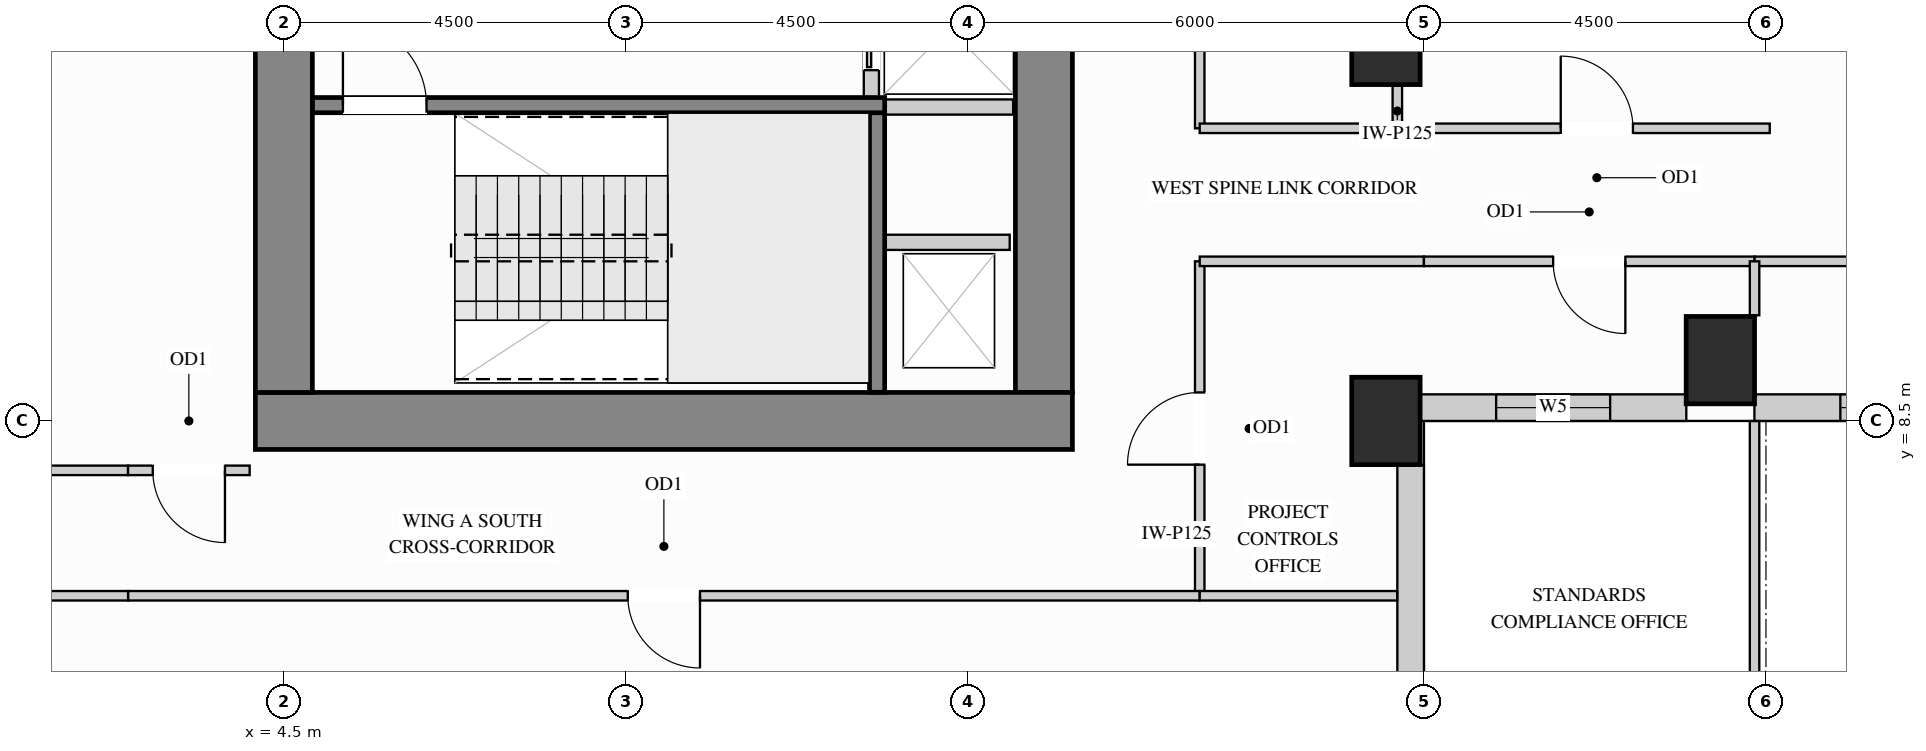
"""IFC4 building model, lengths in metres.
Left out: names, types, materials, properties, quantities, classifications, styles, units other than length and angle.
Written with IfcOpenShell. Run it as: python <this file> out.ifc"""

import sys

from ifc_helpers import new_model, si_unit, direction, frame, frame_2d, origin, origin_2d, place, context, subcontext, project, spatial, rectangle, extrude, source, transform, mapped, element, fill, save


model = new_model("IFC4")
c1 = context("Model", 3, precision=1e-05, world=origin(), true_north=direction((0.0, 1.0)))
c2 = subcontext(c1, "Body", "Model", "MODEL_VIEW")
j1 = project(units=[si_unit("LENGTHUNIT", "METRE"), si_unit("PLANEANGLEUNIT", "RADIAN")], contexts=[c1])
p1 = place(None, origin())
s1 = spatial("IfcSite", under=j1, at=p1, CompositionType="ELEMENT")
p2 = place(p1, origin())
s2 = spatial("IfcBuilding", under=s1, at=p2, CompositionType="ELEMENT")
p3 = place(p2, frame((0.0, 0.0, 109.8)))
s3 = spatial("IfcBuildingStorey", under=s2, at=p3, CompositionType="ELEMENT", Elevation=109.8)
m1 = source(origin(), c2, "Body", "SweptSolid", [
    extrude(rectangle(XDim=0.9, YDim=1.15, at=origin_2d()), origin(), (0.0, 0.0, 1.0), 3.38),
])
for number, where, z_axis, x_axis in (
    (1, (19.0, 13.5, 0.0), (0.0, 0.0, 1.0), (1.0, 0.0, 0.0)),
    (2, (19.0, 8.5, 0.0), (0.0, 0.0, 1.0), (1.0, 0.0, 0.0)),
    (3, (23.4, 9.3, 0.0), (0.0, 0.0, 1.0), (1.0, 0.0, 0.0)),
):
    element("IfcColumn", number, at=place(p3, frame(where, z_axis=z_axis, x_axis=x_axis)), inside=s3, PredefinedType="COLUMN", context=c2, shape_type="MappedRepresentation", body=[
        mapped(m1, transform((0.0, 0.0, 0.0), x_axis=(1.0, 0.0, 0.0), y_axis=(0.0, 1.0, 0.0), z_axis=(0.0, 0.0, 1.0))),
    ])
m2 = source(origin(), c2, "Body", "SweptSolid", [
    extrude(rectangle(XDim=9.945, YDim=0.75, at=frame_2d((4.973, 0.0))), origin(), (0.0, 0.0, 1.0), 3.38),
])
p4 = place(p3, frame((14.5, 8.875, 0.0), z_axis=(0.0, 0.0, 1.0), x_axis=(0.0, 1.0, 0.0)))
e4 = element("IfcWall", 4, at=p4, inside=s3, PredefinedType="SHEAR", context=c2, shape_type="MappedRepresentation", body=[
    mapped(m2, transform((0.0, 0.0, 0.0), x_axis=(1.0, 0.0, 0.0), y_axis=(0.0, 1.0, 0.0), z_axis=(0.0, 0.0, 1.0))),
])
m3 = source(origin(), c2, "Body", "SweptSolid", [
    extrude(rectangle(XDim=10.75, YDim=0.75, at=frame_2d((5.375, 0.0))), origin(), (0.0, 0.0, 1.0), 3.38),
])
p5 = place(p3, frame((4.125, 8.5, 0.0), z_axis=(0.0, 0.0, 1.0), x_axis=(1.0, 0.0, 0.0)))
e5 = element("IfcWall", 5, at=p5, inside=s3, PredefinedType="SHEAR", context=c2, shape_type="MappedRepresentation", body=[
    mapped(m3, transform((0.0, 0.0, 0.0), x_axis=(1.0, 0.0, 0.0), y_axis=(0.0, 1.0, 0.0), z_axis=(0.0, 0.0, 1.0))),
])
m4 = source(origin(), c2, "Body", "SweptSolid", [
    extrude(rectangle(XDim=20.25, YDim=0.75, at=frame_2d((10.125, 0.0))), origin(), (0.0, 0.0, 1.0), 3.38),
])
p6 = place(p3, frame((4.5, 8.875, 0.0), z_axis=(0.0, 0.0, 1.0), x_axis=(0.0, 1.0, 0.0)))
e6 = element("IfcWall", 6, at=p6, inside=s3, PredefinedType="SHEAR", context=c2, shape_type="MappedRepresentation", body=[
    mapped(m4, transform((0.0, 0.0, 0.0), x_axis=(1.0, 0.0, 0.0), y_axis=(0.0, 1.0, 0.0), z_axis=(0.0, 0.0, 1.0))),
])
m5 = source(origin(), c2, "Body", "SweptSolid", [
    extrude(rectangle(XDim=3.854, YDim=0.35, at=frame_2d((1.927, 0.0))), origin(), (0.0, 0.0, 1.0), 2.519),
])
p7 = place(p3, frame((19.325, 4.073, 0.0), z_axis=(0.0, 0.0, 1.0), x_axis=(0.0, 1.0, 0.0)))
e7 = element("IfcWall", 7, at=p7, inside=s3, PredefinedType="SOLIDWALL", context=c2, shape_type="MappedRepresentation", body=[
    mapped(m5, transform((0.0, 0.0, 0.0), x_axis=(1.0, 0.0, 0.0), y_axis=(0.0, 1.0, 0.0), z_axis=(0.0, 0.0, 1.0))),
])
p8 = place(p3, frame((19.448, 8.675, 0.0), z_axis=(0.0, 0.0, 1.0), x_axis=(1.0, 0.0, 0.0)))
e8 = element("IfcWall", 8, at=p8, inside=s3, PredefinedType="SOLIDWALL", context=c2, shape_type="SweptSolid", body=[
    extrude(rectangle(XDim=3.504, YDim=0.35, at=frame_2d((1.752, 0.0))), origin(), (0.0, 0.0, 1.0), 3.365),
])
p9 = place(p8, frame((1.002, 0.0, 0.78)))
e9 = element("IfcOpeningElement", 9, at=p9, cuts=e8, PredefinedType="OPENING", context=c2, shape_type="SweptSolid", body=[
    extrude(rectangle(XDim=1.5, YDim=2.0, at=frame_2d((0.75, 1.0))), frame((0.0, 0.185, 0.0), z_axis=(0.0, -1.0, 0.0), x_axis=(1.0, 0.0, 0.0)), (0.0, 0.0, 1.0), 0.37),
])
p10 = place(p3, frame((23.848, 8.675, 0.0), z_axis=(0.0, 0.0, 1.0), x_axis=(1.0, 0.0, 0.0)))
e10 = element("IfcWall", 10, at=p10, inside=s3, PredefinedType="SOLIDWALL", context=c2, shape_type="SweptSolid", body=[
    extrude(rectangle(XDim=6.204, YDim=0.35, at=frame_2d((3.102, 0.0))), origin(), (0.0, 0.0, 1.0), 3.365),
])
p11 = place(p10, frame((1.131, 0.0, 0.78)))
e11 = element("IfcOpeningElement", 11, at=p11, cuts=e10, PredefinedType="OPENING", context=c2, shape_type="SweptSolid", body=[
    extrude(rectangle(XDim=1.5, YDim=2.0, at=frame_2d((0.75, 1.0))), frame((0.0, 0.185, 0.0), z_axis=(0.0, -1.0, 0.0), x_axis=(1.0, 0.0, 0.0)), (0.0, 0.0, 1.0), 0.37),
])
p12 = place(p10, frame((3.441, 0.0, 0.78)))
e12 = element("IfcOpeningElement", 12, at=p12, cuts=e10, PredefinedType="OPENING", context=c2, shape_type="SweptSolid", body=[
    extrude(rectangle(XDim=1.5, YDim=2.0, at=frame_2d((0.75, 1.0))), frame((0.0, 0.185, 0.0), z_axis=(0.0, -1.0, 0.0), x_axis=(1.0, 0.0, 0.0)), (0.0, 0.0, 1.0), 0.37),
])
m6 = source(origin(), c2, "Body", "SweptSolid", [
    extrude(rectangle(XDim=0.56, YDim=0.125, at=frame_2d((0.28, 0.0))), origin(), (0.0, 0.0, 1.0), 2.677),
])
p13 = place(p3, frame((19.15, 12.35, 0.0), z_axis=(0.0, 0.0, 1.0), x_axis=(0.0, 1.0, 0.0)))
e13 = element("IfcWall", 13, at=p13, inside=s3, PredefinedType="PARTITIONING", context=c2, shape_type="MappedRepresentation", body=[
    mapped(m6, transform((0.0, 0.0, 0.0), x_axis=(1.0, 0.0, 0.0), y_axis=(0.0, 1.0, 0.0), z_axis=(0.0, 0.0, 1.0))),
])
p14 = place(p3, frame((16.55, 12.35, 0.0), z_axis=(0.0, 0.0, 1.0), x_axis=(0.0, 1.0, 0.0)))
e14 = element("IfcWall", 14, at=p14, inside=s3, PredefinedType="PARTITIONING", context=c2, shape_type="SweptSolid", body=[
    extrude(rectangle(XDim=3.15, YDim=0.125, at=frame_2d((1.575, 0.0))), origin(), (0.0, 0.0, 1.0), 3.365),
])
p15 = place(p14, frame((1.1, 0.0, 0.0)))
e15 = element("IfcOpeningElement", 15, at=p15, cuts=e14, PredefinedType="OPENING", context=c2, shape_type="SweptSolid", body=[
    extrude(rectangle(XDim=0.95, YDim=2.15, at=frame_2d((0.475, 1.075))), frame((0.0, 0.073, 0.0), z_axis=(0.0, -1.0, 0.0), x_axis=(1.0, 0.0, 0.0)), (0.0, 0.0, 1.0), 0.145),
])
p16 = place(p3, frame((16.55, 6.2, 0.0), z_axis=(0.0, 0.0, 1.0), x_axis=(0.0, 1.0, 0.0)))
e16 = element("IfcWall", 16, at=p16, inside=s3, PredefinedType="PARTITIONING", context=c2, shape_type="SweptSolid", body=[
    extrude(rectangle(XDim=4.4, YDim=0.125, at=frame_2d((2.2, 0.0))), origin(), (0.0, 0.0, 1.0), 3.365),
])
p17 = place(p16, frame((1.725, 0.0, 0.0)))
e17 = element("IfcOpeningElement", 17, at=p17, cuts=e16, PredefinedType="OPENING", context=c2, shape_type="SweptSolid", body=[
    extrude(rectangle(XDim=0.95, YDim=2.15, at=frame_2d((0.475, 1.075))), frame((0.0, 0.073, 0.0), z_axis=(0.0, -1.0, 0.0), x_axis=(1.0, 0.0, 0.0)), (0.0, 0.0, 1.0), 0.145),
])
m7 = source(origin(), c2, "Body", "SweptSolid", [
    extrude(rectangle(XDim=2.098, YDim=0.125, at=frame_2d((1.049, 0.0))), origin(), (0.0, 0.0, 1.0), 3.365),
])
p18 = place(p3, frame((0.352, 7.85, 0.0), z_axis=(0.0, 0.0, 1.0), x_axis=(1.0, 0.0, 0.0)))
e18 = element("IfcWall", 18, at=p18, inside=s3, PredefinedType="PARTITIONING", context=c2, shape_type="MappedRepresentation", body=[
    mapped(m7, transform((0.0, 0.0, 0.0), x_axis=(1.0, 0.0, 0.0), y_axis=(0.0, 1.0, 0.0), z_axis=(0.0, 0.0, 1.0))),
])
p19 = place(p3, frame((2.45, 7.85, 0.0), z_axis=(0.0, 0.0, 1.0), x_axis=(1.0, 0.0, 0.0)))
e19 = element("IfcWall", 19, at=p19, inside=s3, PredefinedType="PARTITIONING", context=c2, shape_type="SweptSolid", body=[
    extrude(rectangle(XDim=1.6, YDim=0.125, at=frame_2d((0.8, 0.0))), origin(), (0.0, 0.0, 1.0), 3.365),
])
p20 = place(p19, frame((0.325, 0.0, 0.0)))
e20 = element("IfcOpeningElement", 20, at=p20, cuts=e19, PredefinedType="OPENING", context=c2, shape_type="SweptSolid", body=[
    extrude(rectangle(XDim=0.95, YDim=2.15, at=frame_2d((0.475, 1.075))), frame((0.0, 0.073, 0.0), z_axis=(0.0, -1.0, 0.0), x_axis=(1.0, 0.0, 0.0)), (0.0, 0.0, 1.0), 0.145),
])
m8 = source(origin(), c2, "Body", "SweptSolid", [
    extrude(rectangle(XDim=2.95, YDim=0.125, at=frame_2d((1.475, 0.0))), origin(), (0.0, 0.0, 1.0), 3.365),
])
p21 = place(p3, frame((16.55, 12.35, 0.0), z_axis=(0.0, 0.0, 1.0), x_axis=(1.0, 0.0, 0.0)))
e21 = element("IfcWall", 21, at=p21, inside=s3, PredefinedType="PARTITIONING", context=c2, shape_type="MappedRepresentation", body=[
    mapped(m8, transform((0.0, 0.0, 0.0), x_axis=(1.0, 0.0, 0.0), y_axis=(0.0, 1.0, 0.0), z_axis=(0.0, 0.0, 1.0))),
])
p22 = place(p3, frame((19.5, 12.35, 0.0), z_axis=(0.0, 0.0, 1.0), x_axis=(1.0, 0.0, 0.0)))
e22 = element("IfcWall", 22, at=p22, inside=s3, PredefinedType="PARTITIONING", context=c2, shape_type="SweptSolid", body=[
    extrude(rectangle(XDim=4.55, YDim=0.125, at=frame_2d((2.275, 0.0))), origin(), (0.0, 0.0, 1.0), 3.365),
])
p23 = place(p22, frame((1.8, 0.0, 0.0)))
e23 = element("IfcOpeningElement", 23, at=p23, cuts=e22, PredefinedType="OPENING", context=c2, shape_type="SweptSolid", body=[
    extrude(rectangle(XDim=0.95, YDim=2.15, at=frame_2d((0.475, 1.075))), frame((0.0, 0.073, 0.0), z_axis=(0.0, -1.0, 0.0), x_axis=(1.0, 0.0, 0.0)), (0.0, 0.0, 1.0), 0.145),
])
p24 = place(p3, frame((16.55, 10.6, 0.0), z_axis=(0.0, 0.0, 1.0), x_axis=(1.0, 0.0, 0.0)))
e24 = element("IfcWall", 24, at=p24, inside=s3, PredefinedType="PARTITIONING", context=c2, shape_type="MappedRepresentation", body=[
    mapped(m8, transform((0.0, 0.0, 0.0), x_axis=(1.0, 0.0, 0.0), y_axis=(0.0, 1.0, 0.0), z_axis=(0.0, 0.0, 1.0))),
])
p25 = place(p3, frame((19.5, 10.6, 0.0), z_axis=(0.0, 0.0, 1.0), x_axis=(1.0, 0.0, 0.0)))
e25 = element("IfcWall", 25, at=p25, inside=s3, PredefinedType="PARTITIONING", context=c2, shape_type="SweptSolid", body=[
    extrude(rectangle(XDim=4.35, YDim=0.125, at=frame_2d((2.175, 0.0))), origin(), (0.0, 0.0, 1.0), 3.365),
])
p26 = place(p25, frame((1.7, 0.0, 0.0)))
e26 = element("IfcOpeningElement", 26, at=p26, cuts=e25, PredefinedType="OPENING", context=c2, shape_type="SweptSolid", body=[
    extrude(rectangle(XDim=0.95, YDim=2.15, at=frame_2d((0.475, 1.075))), frame((0.0, 0.073, 0.0), z_axis=(0.0, -1.0, 0.0), x_axis=(1.0, 0.0, 0.0)), (0.0, 0.0, 1.0), 0.145),
])
p27 = place(p3, frame((23.85, 10.6, 0.0), z_axis=(0.0, 0.0, 1.0), x_axis=(1.0, 0.0, 0.0)))
e27 = element("IfcWall", 27, at=p27, inside=s3, PredefinedType="PARTITIONING", context=c2, shape_type="SweptSolid", body=[
    extrude(rectangle(XDim=6.0, YDim=0.125, at=frame_2d((3.0, 0.0))), origin(), (0.0, 0.0, 1.0), 3.365),
])
p28 = place(p27, frame((2.525, 0.0, 0.0)))
e28 = element("IfcOpeningElement", 28, at=p28, cuts=e27, PredefinedType="OPENING", context=c2, shape_type="SweptSolid", body=[
    extrude(rectangle(XDim=0.95, YDim=2.15, at=frame_2d((0.475, 1.075))), frame((0.0, 0.073, 0.0), z_axis=(0.0, -1.0, 0.0), x_axis=(1.0, 0.0, 0.0)), (0.0, 0.0, 1.0), 0.145),
])
m9 = source(origin(), c2, "Body", "SweptSolid", [
    extrude(rectangle(XDim=8.148, YDim=0.125, at=frame_2d((4.074, 0.0))), origin(), (0.0, 0.0, 1.0), 3.365),
])
p29 = place(p3, frame((23.85, 0.35, 0.0), z_axis=(0.0, 0.0, 1.0), x_axis=(0.0, 1.0, 0.0)))
e29 = element("IfcWall", 29, at=p29, inside=s3, PredefinedType="PARTITIONING", context=c2, shape_type="MappedRepresentation", body=[
    mapped(m9, transform((0.0, 0.0, 0.0), x_axis=(1.0, 0.0, 0.0), y_axis=(0.0, 1.0, 0.0), z_axis=(0.0, 0.0, 1.0))),
])
m10 = source(origin(), c2, "Body", "SweptSolid", [
    extrude(rectangle(XDim=0.71, YDim=0.125, at=frame_2d((0.355, 0.0))), origin(), (0.0, 0.0, 1.0), 3.365),
])
p30 = place(p3, frame((23.85, 9.89, 0.0), z_axis=(0.0, 0.0, 1.0), x_axis=(0.0, 1.0, 0.0)))
e30 = element("IfcWall", 30, at=p30, inside=s3, PredefinedType="PARTITIONING", context=c2, shape_type="MappedRepresentation", body=[
    mapped(m10, transform((0.0, 0.0, 0.0), x_axis=(1.0, 0.0, 0.0), y_axis=(0.0, 1.0, 0.0), z_axis=(0.0, 0.0, 1.0))),
])
p31 = place(p3, frame((2.45, 6.2, 0.0), z_axis=(0.0, 0.0, 1.0), x_axis=(1.0, 0.0, 0.0)))
e31 = element("IfcWall", 31, at=p31, inside=s3, PredefinedType="PARTITIONING", context=c2, shape_type="SweptSolid", body=[
    extrude(rectangle(XDim=14.1, YDim=0.125, at=frame_2d((7.05, 0.0))), origin(), (0.0, 0.0, 1.0), 2.828),
])
p32 = place(p31, frame((6.575, 0.0, 0.0)))
e32 = element("IfcOpeningElement", 32, at=p32, cuts=e31, PredefinedType="OPENING", context=c2, shape_type="SweptSolid", body=[
    extrude(rectangle(XDim=0.95, YDim=2.15, at=frame_2d((0.475, 1.075))), frame((0.0, 0.073, 0.0), z_axis=(0.0, -1.0, 0.0), x_axis=(1.0, 0.0, 0.0)), (0.0, 0.0, 1.0), 0.145),
])
m11 = source(origin(), c2, "Body", "SweptSolid", [
    extrude(rectangle(XDim=2.098, YDim=0.125, at=frame_2d((1.049, 0.0))), origin(), (0.0, 0.0, 1.0), 2.828),
])
p33 = place(p3, frame((0.352, 6.2, 0.0), z_axis=(0.0, 0.0, 1.0), x_axis=(1.0, 0.0, 0.0)))
e33 = element("IfcWall", 33, at=p33, inside=s3, PredefinedType="PARTITIONING", context=c2, shape_type="MappedRepresentation", body=[
    mapped(m11, transform((0.0, 0.0, 0.0), x_axis=(1.0, 0.0, 0.0), y_axis=(0.0, 1.0, 0.0), z_axis=(0.0, 0.0, 1.0))),
])
m12 = source(origin(), c2, "Body", "SweptSolid", [
    extrude(rectangle(XDim=2.598, YDim=0.125, at=frame_2d((1.299, 0.0))), origin(), (0.0, 0.0, 1.0), 2.828),
])
p34 = place(p3, frame((16.55, 6.2, 0.0), z_axis=(0.0, 0.0, 1.0), x_axis=(1.0, 0.0, 0.0)))
e34 = element("IfcWall", 34, at=p34, inside=s3, PredefinedType="PARTITIONING", context=c2, shape_type="MappedRepresentation", body=[
    mapped(m12, transform((0.0, 0.0, 0.0), x_axis=(1.0, 0.0, 0.0), y_axis=(0.0, 1.0, 0.0), z_axis=(0.0, 0.0, 1.0))),
])
m13 = source(origin(), c2, "Body", "SweptSolid", [
    extrude(rectangle(XDim=1.63, YDim=0.2, at=frame_2d((0.815, 0.0))), origin(), (0.0, 0.0, 1.0), 3.365),
])
p35 = place(p3, frame((12.42, 10.85, 0.0), z_axis=(0.0, 0.0, 1.0), x_axis=(1.0, 0.0, 0.0)))
e35 = element("IfcWall", 35, at=p35, inside=s3, PredefinedType="PARTITIONING", context=c2, shape_type="MappedRepresentation", body=[
    mapped(m13, transform((0.0, 0.0, 0.0), x_axis=(1.0, 0.0, 0.0), y_axis=(0.0, 1.0, 0.0), z_axis=(0.0, 0.0, 1.0))),
])
m14 = source(origin(), c2, "Body", "SweptSolid", [
    extrude(rectangle(XDim=1.865, YDim=0.2, at=frame_2d((0.933, 0.0))), origin(), (0.0, 0.0, 1.0), 3.365),
])
p36 = place(p3, frame((12.23, 12.63, 0.0), z_axis=(0.0, 0.0, 1.0), x_axis=(1.0, 0.0, 0.0)))
e36 = element("IfcWall", 36, at=p36, inside=s3, PredefinedType="PARTITIONING", context=c2, shape_type="MappedRepresentation", body=[
    mapped(m14, transform((0.0, 0.0, 0.0), x_axis=(1.0, 0.0, 0.0), y_axis=(0.0, 1.0, 0.0), z_axis=(0.0, 0.0, 1.0))),
])
p37 = place(p3, frame((12.23, 12.63, 0.0), z_axis=(0.0, 0.0, 1.0), x_axis=(0.0, 1.0, 0.0)))
e37 = element("IfcWall", 37, at=p37, inside=s3, PredefinedType="PARTITIONING", context=c2, shape_type="SweptSolid", body=[
    extrude(rectangle(XDim=2.07, YDim=0.2, at=frame_2d((1.035, 0.0))), origin(), (0.0, 0.0, 1.0), 3.365),
])
p38 = place(p37, frame((0.485, 0.0, 0.0)))
e38 = element("IfcOpeningElement", 38, at=p38, cuts=e37, PredefinedType="OPENING", context=c2, shape_type="SweptSolid", body=[
    extrude(rectangle(XDim=1.1, YDim=2.2, at=frame_2d((0.55, 1.1))), frame((0.0, 0.11, 0.0), z_axis=(0.0, -1.0, 0.0), x_axis=(1.0, 0.0, 0.0)), (0.0, 0.0, 1.0), 0.22),
])
m15 = source(origin(), c2, "Body", "SweptSolid", [
    extrude(rectangle(XDim=3.678, YDim=0.2, at=frame_2d((1.839, 0.0))), origin(), (0.0, 0.0, 1.0), 3.38),
])
p39 = place(p3, frame((12.305, 8.877, 0.0), z_axis=(0.0, 0.0, 1.0), x_axis=(0.0, 1.0, 0.0)))
e39 = element("IfcWall", 39, at=p39, inside=s3, PredefinedType="SHEAR", context=c2, shape_type="MappedRepresentation", body=[
    mapped(m15, transform((0.0, 0.0, 0.0), x_axis=(1.0, 0.0, 0.0), y_axis=(0.0, 1.0, 0.0), z_axis=(0.0, 0.0, 1.0))),
])
p40 = place(p3, frame((4.877, 12.655, 0.0), z_axis=(0.0, 0.0, 1.0), x_axis=(1.0, 0.0, 0.0)))
e40 = element("IfcWall", 40, at=p40, inside=s3, PredefinedType="SHEAR", context=c2, shape_type="SweptSolid", body=[
    extrude(rectangle(XDim=7.528, YDim=0.2, at=frame_2d((3.764, 0.0))), origin(), (0.0, 0.0, 1.0), 3.38),
])
p41 = place(p40, frame((0.4, 0.0, 0.0)))
e41 = element("IfcOpeningElement", 41, at=p41, cuts=e40, PredefinedType="OPENING", context=c2, shape_type="SweptSolid", body=[
    extrude(rectangle(XDim=1.1, YDim=2.15, at=frame_2d((0.55, 1.075))), frame((0.0, 0.11, 0.0), z_axis=(0.0, -1.0, 0.0), x_axis=(1.0, 0.0, 0.0)), (0.0, 0.0, 1.0), 0.22),
])
m16 = source(origin(), c2, "Body", "SweptSolid", [
    extrude(rectangle(XDim=1.1, YDim=2.2, at=frame_2d((0.55, 1.1))), frame((0.0, 0.025, 0.0), z_axis=(0.0, -1.0, 0.0), x_axis=(1.0, 0.0, 0.0)), (0.0, 0.0, 1.0), 0.05),
])
p42 = place(p38, origin())
e42 = element("IfcDoor", 42, at=p42, inside=s3, OperationType="SLIDING_TO_LEFT", PredefinedType="DOOR", context=c2, shape_type="MappedRepresentation", body=[
    mapped(m16, transform((0.0, 0.0, 0.0), x_axis=(1.0, 0.0, 0.0), y_axis=(0.0, 1.0, 0.0), z_axis=(0.0, 0.0, 1.0))),
])
fill(e38, e42)
m17 = source(origin(), c2, "Body", "SweptSolid", [
    extrude(rectangle(XDim=0.95, YDim=2.15, at=frame_2d((0.475, 1.075))), frame((0.0, 0.025, 0.0), z_axis=(0.0, -1.0, 0.0), x_axis=(1.0, 0.0, 0.0)), (0.0, 0.0, 1.0), 0.05),
])
p43 = place(p17, origin())
e43 = element("IfcDoor", 43, at=p43, inside=s3, OperationType="SINGLE_SWING_LEFT", PredefinedType="DOOR", context=c2, shape_type="MappedRepresentation", body=[
    mapped(m17, transform((0.0, 0.0, 0.0), x_axis=(1.0, 0.0, 0.0), y_axis=(0.0, 1.0, 0.0), z_axis=(0.0, 0.0, 1.0))),
])
fill(e17, e43)
p44 = place(p32, origin())
e44 = element("IfcDoor", 44, at=p44, inside=s3, OperationType="SINGLE_SWING_RIGHT", PredefinedType="DOOR", context=c2, shape_type="MappedRepresentation", body=[
    mapped(m17, transform((0.0, 0.0, 0.0), x_axis=(1.0, 0.0, 0.0), y_axis=(0.0, 1.0, 0.0), z_axis=(0.0, 0.0, 1.0))),
])
fill(e32, e44)
p45 = place(p23, origin())
e45 = element("IfcDoor", 45, at=p45, inside=s3, OperationType="SINGLE_SWING_LEFT", PredefinedType="DOOR", context=c2, shape_type="MappedRepresentation", body=[
    mapped(m17, transform((0.0, 0.0, 0.0), x_axis=(1.0, 0.0, 0.0), y_axis=(0.0, 1.0, 0.0), z_axis=(0.0, 0.0, 1.0))),
])
fill(e23, e45)
p46 = place(p26, origin())
e46 = element("IfcDoor", 46, at=p46, inside=s3, OperationType="SINGLE_SWING_RIGHT", PredefinedType="DOOR", context=c2, shape_type="MappedRepresentation", body=[
    mapped(m17, transform((0.0, 0.0, 0.0), x_axis=(1.0, 0.0, 0.0), y_axis=(0.0, 1.0, 0.0), z_axis=(0.0, 0.0, 1.0))),
])
fill(e26, e46)
p47 = place(p20, origin())
e47 = element("IfcDoor", 47, at=p47, inside=s3, OperationType="SINGLE_SWING_RIGHT", PredefinedType="DOOR", context=c2, shape_type="MappedRepresentation", body=[
    mapped(m17, transform((0.0, 0.0, 0.0), x_axis=(1.0, 0.0, 0.0), y_axis=(0.0, 1.0, 0.0), z_axis=(0.0, 0.0, 1.0))),
])
fill(e20, e47)
m18 = source(origin(), c2, "Body", "SweptSolid", [
    extrude(rectangle(XDim=1.1, YDim=2.15, at=frame_2d((0.55, 1.075))), frame((0.0, 0.025, 0.0), z_axis=(0.0, -1.0, 0.0), x_axis=(1.0, 0.0, 0.0)), (0.0, 0.0, 1.0), 0.05),
])
p48 = place(p41, origin())
e48 = element("IfcDoor", 48, at=p48, inside=s3, OperationType="SINGLE_SWING_LEFT", PredefinedType="DOOR", context=c2, shape_type="MappedRepresentation", body=[
    mapped(m18, transform((0.0, 0.0, 0.0), x_axis=(1.0, 0.0, 0.0), y_axis=(0.0, 1.0, 0.0), z_axis=(0.0, 0.0, 1.0))),
])
fill(e41, e48)
m19 = source(origin(), c2, "Body", "SweptSolid", [
    extrude(rectangle(XDim=1.5, YDim=2.0, at=frame_2d((0.75, 1.0))), frame((0.0, 0.03, 0.0), z_axis=(0.0, -1.0, 0.0), x_axis=(1.0, 0.0, 0.0)), (0.0, 0.0, 1.0), 0.06),
])
p49 = place(p9, origin())
e49 = element("IfcWindow", 49, at=p49, inside=s3, PartitioningType="SINGLE_PANEL", PredefinedType="WINDOW", context=c2, shape_type="MappedRepresentation", body=[
    mapped(m19, transform((0.0, 0.0, 0.0), x_axis=(1.0, 0.0, 0.0), y_axis=(0.0, 1.0, 0.0), z_axis=(0.0, 0.0, 1.0))),
])
fill(e9, e49)
p50 = place(p11, origin())
e50 = element("IfcWindow", 50, at=p50, inside=s3, PartitioningType="SINGLE_PANEL", PredefinedType="WINDOW", context=c2, shape_type="MappedRepresentation", body=[
    mapped(m19, transform((0.0, 0.0, 0.0), x_axis=(1.0, 0.0, 0.0), y_axis=(0.0, 1.0, 0.0), z_axis=(0.0, 0.0, 1.0))),
])
fill(e11, e50)
save(model, sys.argv[1])
